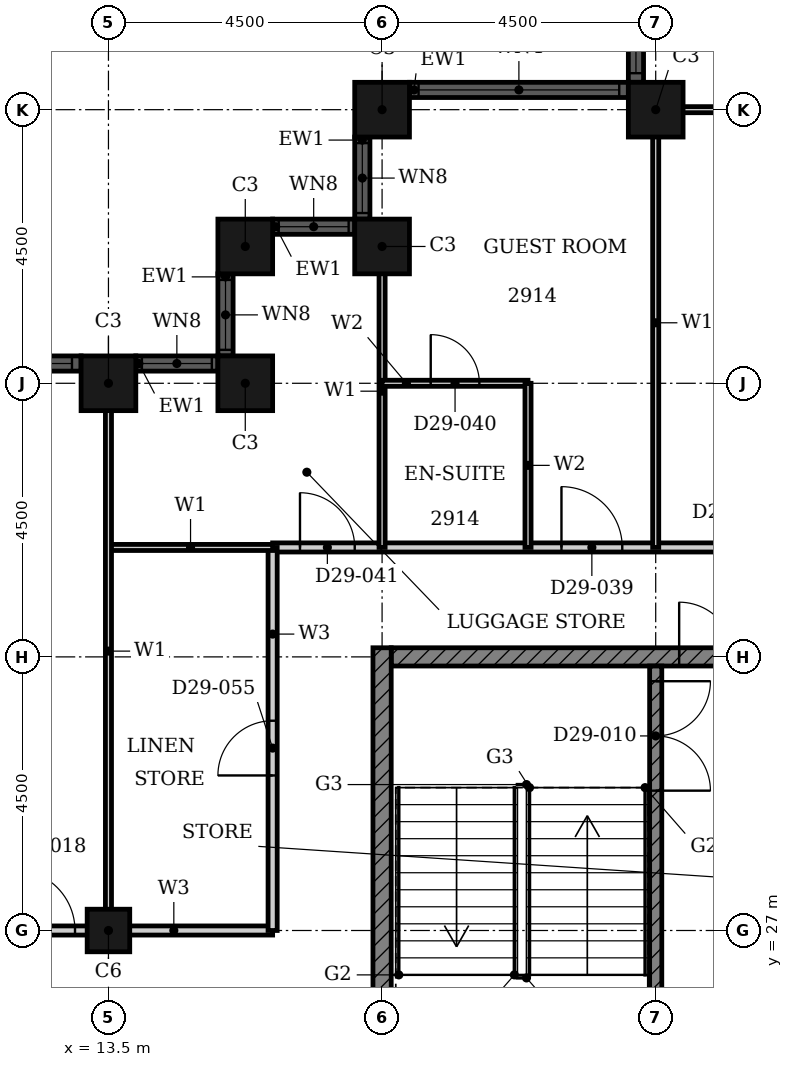
"""IFC4 building model, lengths in metres.
Left out: names, types, materials, properties, quantities, classifications, styles, units other than length and angle.
Written with IfcOpenShell. Run it as: python <this file> out.ifc"""

import sys

from ifc_helpers import new_model, si_unit, direction, frame, frame_2d, origin, origin_2d, place, context, subcontext, project, spatial, rectangle, hollow_rectangle, extrude, element, fill, save


model = new_model("IFC4")
c1 = context("Model", 3, precision=1e-05, world=origin(), true_north=direction((0.0, 1.0)))
c2 = subcontext(c1, "Body", "Model", "MODEL_VIEW")
j1 = project(units=[si_unit("LENGTHUNIT", "METRE"), si_unit("PLANEANGLEUNIT", "RADIAN")], contexts=[c1])
p1 = place(None, origin())
s1 = spatial("IfcSite", under=j1, at=p1, CompositionType="ELEMENT")
p2 = place(p1, origin())
s2 = spatial("IfcBuilding", under=s1, at=p2, CompositionType="ELEMENT")
p3 = place(p2, frame((0.0, 0.0, 118.8)))
s3 = spatial("IfcBuildingStorey", under=s2, at=p3, CompositionType="ELEMENT", Elevation=118.8)
for number, where, z_axis, x_axis in (
    (1, (22.5, 40.5, 0.0), (0.0, 0.0, 1.0), (1.0, 0.0, 0.0)),
    (2, (18.0, 40.5, 0.0), (0.0, 0.0, 1.0), (1.0, 0.0, 0.0)),
    (3, (18.0, 38.25, 0.0), (0.0, 0.0, 1.0), (1.0, 0.0, 0.0)),
    (4, (15.75, 38.25, 0.0), (0.0, 0.0, 1.0), (1.0, 0.0, 0.0)),
    (5, (15.75, 36.0, 0.0), (0.0, 0.0, 1.0), (1.0, 0.0, 0.0)),
    (6, (13.5, 36.0, 0.0), (0.0, 0.0, 1.0), (1.0, 0.0, 0.0)),
):
    element("IfcColumn", number, at=place(p3, frame(where, z_axis=z_axis, x_axis=x_axis)), inside=s3, PredefinedType="COLUMN", context=c2, shape_type="SweptSolid", body=[
        extrude(hollow_rectangle(XDim=0.9, YDim=0.9, WallThickness=0.028, at=origin_2d()), origin(), (0.0, 0.0, 1.0), 3.6),
    ])
p4 = place(p3, frame((13.5, 27.0, 0.0), z_axis=(0.0, 0.0, 1.0), x_axis=(1.0, 0.0, 0.0)))
e7 = element("IfcColumn", 7, at=p4, inside=s3, PredefinedType="COLUMN", context=c2, shape_type="SweptSolid", body=[
    extrude(hollow_rectangle(XDim=0.7, YDim=0.7, WallThickness=0.022, at=origin_2d()), origin(), (0.0, 0.0, 1.0), 3.6),
])
p5 = place(p3, frame((22.175, 49.05, 0.0), z_axis=(0.0, 0.0, 1.0), x_axis=(0.0, -1.0, 0.0)))
e8 = element("IfcWall", 8, at=p5, inside=s3, PredefinedType="SOLIDWALL", context=c2, shape_type="SweptSolid", body=[
    extrude(rectangle(XDim=8.1, YDim=0.25, at=frame_2d((4.05, 0.0))), origin(), (0.0, 0.0, 1.0), 3.6),
])
p6 = place(p5, frame((0.15, 0.0, 0.9)))
e9 = element("IfcOpeningElement", 9, at=p6, cuts=e8, PredefinedType="OPENING", context=c2, shape_type="SweptSolid", body=[
    extrude(rectangle(XDim=3.3, YDim=2.08, at=frame_2d((1.65, 1.04))), frame((0.0, 0.135, 0.0), z_axis=(0.0, -1.0, 0.0), x_axis=(1.0, 0.0, 0.0)), (0.0, 0.0, 1.0), 0.27),
])
p7 = place(p5, frame((4.65, 0.0, 0.9)))
e10 = element("IfcOpeningElement", 10, at=p7, cuts=e8, PredefinedType="OPENING", context=c2, shape_type="SweptSolid", body=[
    extrude(rectangle(XDim=3.3, YDim=2.08, at=frame_2d((1.65, 1.04))), frame((0.0, 0.135, 0.0), z_axis=(0.0, -1.0, 0.0), x_axis=(1.0, 0.0, 0.0)), (0.0, 0.0, 1.0), 0.27),
])
p8 = place(p3, frame((22.05, 40.825, 0.0), z_axis=(0.0, 0.0, 1.0), x_axis=(-1.0, 0.0, 0.0)))
e11 = element("IfcWall", 11, at=p8, inside=s3, PredefinedType="SOLIDWALL", context=c2, shape_type="SweptSolid", body=[
    extrude(rectangle(XDim=3.6, YDim=0.25, at=frame_2d((1.8, 0.0))), origin(), (0.0, 0.0, 1.0), 3.6),
])
p9 = place(p8, frame((0.15, 0.0, 0.9)))
e12 = element("IfcOpeningElement", 12, at=p9, cuts=e11, PredefinedType="OPENING", context=c2, shape_type="SweptSolid", body=[
    extrude(rectangle(XDim=3.3, YDim=2.08, at=frame_2d((1.65, 1.04))), frame((0.0, 0.135, 0.0), z_axis=(0.0, -1.0, 0.0), x_axis=(1.0, 0.0, 0.0)), (0.0, 0.0, 1.0), 0.27),
])
p10 = place(p3, frame((17.675, 40.05, 0.0), z_axis=(0.0, 0.0, 1.0), x_axis=(0.0, -1.0, 0.0)))
e13 = element("IfcWall", 13, at=p10, inside=s3, PredefinedType="SOLIDWALL", context=c2, shape_type="SweptSolid", body=[
    extrude(rectangle(XDim=1.35, YDim=0.25, at=frame_2d((0.675, 0.0))), origin(), (0.0, 0.0, 1.0), 3.6),
])
p11 = place(p10, frame((0.1, 0.0, 0.9)))
e14 = element("IfcOpeningElement", 14, at=p11, cuts=e13, PredefinedType="OPENING", context=c2, shape_type="SweptSolid", body=[
    extrude(rectangle(XDim=1.15, YDim=2.08, at=frame_2d((0.575, 1.04))), frame((0.0, 0.135, 0.0), z_axis=(0.0, -1.0, 0.0), x_axis=(1.0, 0.0, 0.0)), (0.0, 0.0, 1.0), 0.27),
])
p12 = place(p3, frame((17.55, 38.575, 0.0), z_axis=(0.0, 0.0, 1.0), x_axis=(-1.0, 0.0, 0.0)))
e15 = element("IfcWall", 15, at=p12, inside=s3, PredefinedType="SOLIDWALL", context=c2, shape_type="SweptSolid", body=[
    extrude(rectangle(XDim=1.35, YDim=0.25, at=frame_2d((0.675, 0.0))), origin(), (0.0, 0.0, 1.0), 3.6),
])
p13 = place(p12, frame((0.1, 0.0, 0.9)))
e16 = element("IfcOpeningElement", 16, at=p13, cuts=e15, PredefinedType="OPENING", context=c2, shape_type="SweptSolid", body=[
    extrude(rectangle(XDim=1.15, YDim=2.08, at=frame_2d((0.575, 1.04))), frame((0.0, 0.135, 0.0), z_axis=(0.0, -1.0, 0.0), x_axis=(1.0, 0.0, 0.0)), (0.0, 0.0, 1.0), 0.27),
])
p14 = place(p3, frame((15.425, 37.8, 0.0), z_axis=(0.0, 0.0, 1.0), x_axis=(0.0, -1.0, 0.0)))
e17 = element("IfcWall", 17, at=p14, inside=s3, PredefinedType="SOLIDWALL", context=c2, shape_type="SweptSolid", body=[
    extrude(rectangle(XDim=1.35, YDim=0.25, at=frame_2d((0.675, 0.0))), origin(), (0.0, 0.0, 1.0), 3.6),
])
p15 = place(p14, frame((0.1, 0.0, 0.9)))
e18 = element("IfcOpeningElement", 18, at=p15, cuts=e17, PredefinedType="OPENING", context=c2, shape_type="SweptSolid", body=[
    extrude(rectangle(XDim=1.15, YDim=2.08, at=frame_2d((0.575, 1.04))), frame((0.0, 0.135, 0.0), z_axis=(0.0, -1.0, 0.0), x_axis=(1.0, 0.0, 0.0)), (0.0, 0.0, 1.0), 0.27),
])
p16 = place(p3, frame((15.3, 36.325, 0.0), z_axis=(0.0, 0.0, 1.0), x_axis=(-1.0, 0.0, 0.0)))
e19 = element("IfcWall", 19, at=p16, inside=s3, PredefinedType="SOLIDWALL", context=c2, shape_type="SweptSolid", body=[
    extrude(rectangle(XDim=1.35, YDim=0.25, at=frame_2d((0.675, 0.0))), origin(), (0.0, 0.0, 1.0), 3.6),
])
p17 = place(p16, frame((0.1, 0.0, 0.9)))
e20 = element("IfcOpeningElement", 20, at=p17, cuts=e19, PredefinedType="OPENING", context=c2, shape_type="SweptSolid", body=[
    extrude(rectangle(XDim=1.15, YDim=2.08, at=frame_2d((0.575, 1.04))), frame((0.0, 0.135, 0.0), z_axis=(0.0, -1.0, 0.0), x_axis=(1.0, 0.0, 0.0)), (0.0, 0.0, 1.0), 0.27),
])
p18 = place(p3, frame((13.05, 36.325, 0.0), z_axis=(0.0, 0.0, 1.0), x_axis=(-1.0, 0.0, 0.0)))
e21 = element("IfcWall", 21, at=p18, inside=s3, PredefinedType="SOLIDWALL", context=c2, shape_type="SweptSolid", body=[
    extrude(rectangle(XDim=8.1, YDim=0.25, at=frame_2d((4.05, 0.0))), origin(), (0.0, 0.0, 1.0), 3.6),
])
p19 = place(p18, frame((0.15, 0.0, 0.9)))
e22 = element("IfcOpeningElement", 22, at=p19, cuts=e21, PredefinedType="OPENING", context=c2, shape_type="SweptSolid", body=[
    extrude(rectangle(XDim=3.3, YDim=2.08, at=frame_2d((1.65, 1.04))), frame((0.0, 0.135, 0.0), z_axis=(0.0, -1.0, 0.0), x_axis=(1.0, 0.0, 0.0)), (0.0, 0.0, 1.0), 0.27),
])
p20 = place(p18, frame((4.65, 0.0, 0.9)))
e23 = element("IfcOpeningElement", 23, at=p20, cuts=e21, PredefinedType="OPENING", context=c2, shape_type="SweptSolid", body=[
    extrude(rectangle(XDim=3.3, YDim=2.08, at=frame_2d((1.65, 1.04))), frame((0.0, 0.135, 0.0), z_axis=(0.0, -1.0, 0.0), x_axis=(1.0, 0.0, 0.0)), (0.0, 0.0, 1.0), 0.27),
])
p21 = place(p3, frame((18.15, 31.5, 0.0), z_axis=(0.0, 0.0, 1.0), x_axis=(1.0, 0.0, 0.0)))
e24 = element("IfcWall", 24, at=p21, inside=s3, PredefinedType="SHEAR", context=c2, shape_type="SweptSolid", body=[
    extrude(rectangle(XDim=6.797, YDim=0.3, at=frame_2d((3.398, 0.0))), origin(), (0.0, 0.0, 1.0), 3.3),
])
p22 = place(p21, frame((4.736, 0.0, 0.0)))
e25 = element("IfcOpeningElement", 25, at=p22, cuts=e24, PredefinedType="OPENING", context=c2, shape_type="SweptSolid", body=[
    extrude(rectangle(XDim=1.8, YDim=2.1, at=frame_2d((0.9, 1.05))), frame((0.0, 0.16, 0.0), z_axis=(0.0, -1.0, 0.0), x_axis=(1.0, 0.0, 0.0)), (0.0, 0.0, 1.0), 0.32),
])
p23 = place(p3, frame((18.0, 22.35, 0.0), z_axis=(0.0, 0.0, 1.0), x_axis=(0.0, 1.0, 0.0)))
e26 = element("IfcWall", 26, at=p23, inside=s3, PredefinedType="SHEAR", context=c2, shape_type="SweptSolid", body=[
    extrude(rectangle(XDim=9.3, YDim=0.3, at=frame_2d((4.65, 0.0))), origin(), (0.0, 0.0, 1.0), 3.3),
])
p24 = place(p3, frame((22.5, 31.35, 0.0), z_axis=(0.0, 0.0, 1.0), x_axis=(0.0, -1.0, 0.0)))
e27 = element("IfcWall", 27, at=p24, inside=s3, PredefinedType="SHEAR", context=c2, shape_type="SweptSolid", body=[
    extrude(rectangle(XDim=5.825, YDim=0.2, at=frame_2d((2.913, 0.0))), origin(), (0.0, 0.0, 1.0), 3.3),
])
p25 = place(p24, frame((0.25, 0.0, 0.0)))
e28 = element("IfcOpeningElement", 28, at=p25, cuts=e27, PredefinedType="OPENING", context=c2, shape_type="SweptSolid", body=[
    extrude(rectangle(XDim=1.8, YDim=2.1, at=frame_2d((0.9, 1.05))), frame((0.0, 0.11, 0.0), z_axis=(0.0, -1.0, 0.0), x_axis=(1.0, 0.0, 0.0)), (0.0, 0.0, 1.0), 0.22),
])
p26 = place(p3, frame((9.0, 27.0, 0.0), z_axis=(0.0, 0.0, 1.0), x_axis=(1.0, 0.0, 0.0)))
e29 = element("IfcWall", 29, at=p26, inside=s3, PredefinedType="PARTITIONING", context=c2, shape_type="SweptSolid", body=[
    extrude(rectangle(XDim=7.2, YDim=0.15, at=frame_2d((3.6, 0.0))), origin(), (0.0, 0.0, 1.0), 2.58),
])
p27 = place(p26, frame((2.95, 0.0, 0.0)))
e30 = element("IfcOpeningElement", 30, at=p27, cuts=e29, PredefinedType="OPENING", context=c2, shape_type="SweptSolid", body=[
    extrude(rectangle(XDim=1.0, YDim=2.1, at=frame_2d((0.5, 1.05))), frame((0.0, 0.085, 0.0), z_axis=(0.0, -1.0, 0.0), x_axis=(1.0, 0.0, 0.0)), (0.0, 0.0, 1.0), 0.17),
])
p28 = place(p3, frame((16.2, 33.3, 0.0), z_axis=(0.0, 0.0, 1.0), x_axis=(1.0, 0.0, 0.0)))
e31 = element("IfcWall", 31, at=p28, inside=s3, PredefinedType="PARTITIONING", context=c2, shape_type="SweptSolid", body=[
    extrude(rectangle(XDim=15.3, YDim=0.15, at=frame_2d((7.65, 0.0))), origin(), (0.0, 0.0, 1.0), 3.3),
])
p29 = place(p28, frame((4.75, 0.0, 0.0)))
e32 = element("IfcOpeningElement", 32, at=p29, cuts=e31, PredefinedType="OPENING", context=c2, shape_type="SweptSolid", body=[
    extrude(rectangle(XDim=1.0, YDim=2.1, at=frame_2d((0.5, 1.05))), frame((0.0, 0.085, 0.0), z_axis=(0.0, -1.0, 0.0), x_axis=(1.0, 0.0, 0.0)), (0.0, 0.0, 1.0), 0.17),
])
p30 = place(p28, frame((0.45, 0.0, 0.0)))
e33 = element("IfcOpeningElement", 33, at=p30, cuts=e31, PredefinedType="OPENING", context=c2, shape_type="SweptSolid", body=[
    extrude(rectangle(XDim=0.9, YDim=2.1, at=frame_2d((0.45, 1.05))), frame((0.0, 0.085, 0.0), z_axis=(0.0, -1.0, 0.0), x_axis=(1.0, 0.0, 0.0)), (0.0, 0.0, 1.0), 0.17),
])
p31 = place(p28, frame((10.35, 0.0, 0.0)))
e34 = element("IfcOpeningElement", 34, at=p31, cuts=e31, PredefinedType="OPENING", context=c2, shape_type="SweptSolid", body=[
    extrude(rectangle(XDim=0.9, YDim=2.1, at=frame_2d((0.45, 1.05))), frame((0.0, 0.085, 0.0), z_axis=(0.0, -1.0, 0.0), x_axis=(1.0, 0.0, 0.0)), (0.0, 0.0, 1.0), 0.17),
])
p32 = place(p3, frame((16.2, 27.0, 0.0), z_axis=(0.0, 0.0, 1.0), x_axis=(0.0, 1.0, 0.0)))
e35 = element("IfcWall", 35, at=p32, inside=s3, PredefinedType="PARTITIONING", context=c2, shape_type="SweptSolid", body=[
    extrude(rectangle(XDim=6.3, YDim=0.15, at=frame_2d((3.15, 0.0))), origin(), (0.0, 0.0, 1.0), 3.3),
])
p33 = place(p32, frame((2.55, 0.0, 0.0)))
e36 = element("IfcOpeningElement", 36, at=p33, cuts=e35, PredefinedType="OPENING", context=c2, shape_type="SweptSolid", body=[
    extrude(rectangle(XDim=0.9, YDim=2.1, at=frame_2d((0.45, 1.05))), frame((0.0, 0.085, 0.0), z_axis=(0.0, -1.0, 0.0), x_axis=(1.0, 0.0, 0.0)), (0.0, 0.0, 1.0), 0.17),
])
p34 = place(p3, frame((13.5, 33.3, 0.0), z_axis=(0.0, 0.0, 1.0), x_axis=(1.0, 0.0, 0.0)))
e37 = element("IfcWall", 37, at=p34, inside=s3, PredefinedType="PARTITIONING", context=c2, shape_type="SweptSolid", body=[
    extrude(rectangle(XDim=2.7, YDim=0.1, at=frame_2d((1.35, 0.0))), origin(), (0.0, 0.0, 1.0), 3.3),
])
for number, where, z_axis, x_axis in (
    (38, (22.31, 40.5, 0.0), (0.0, 0.0, 1.0), (1.0, 0.0, 0.0)),
    (39, (13.5, 27.0, 0.0), (0.0, 0.0, 1.0), (0.0, 1.0, 0.0)),
):
    element("IfcWall", number, at=place(p3, frame(where, z_axis=z_axis, x_axis=x_axis)), inside=s3, PredefinedType="PARTITIONING", context=c2, shape_type="SweptSolid", body=[
        extrude(rectangle(XDim=9.19, YDim=0.1, at=frame_2d((4.595, 0.0))), origin(), (0.0, 0.0, 1.0), 2.38),
    ])
p35 = place(p3, frame((18.0, 33.3, 0.0), z_axis=(0.0, 0.0, 1.0), x_axis=(0.0, 1.0, 0.0)))
e40 = element("IfcWall", 40, at=p35, inside=s3, PredefinedType="PARTITIONING", context=c2, shape_type="SweptSolid", body=[
    extrude(rectangle(XDim=5.14, YDim=0.1, at=frame_2d((2.57, 0.0))), origin(), (0.0, 0.0, 1.0), 3.3),
])
p36 = place(p3, frame((22.5, 33.3, 0.0), z_axis=(0.0, 0.0, 1.0), x_axis=(0.0, 1.0, 0.0)))
e41 = element("IfcWall", 41, at=p36, inside=s3, PredefinedType="PARTITIONING", context=c2, shape_type="SweptSolid", body=[
    extrude(rectangle(XDim=7.39, YDim=0.1, at=frame_2d((3.695, 0.0))), origin(), (0.0, 0.0, 1.0), 3.3),
])
p37 = place(p3, frame((18.0, 36.0, 0.0), z_axis=(0.0, 0.0, 1.0), x_axis=(1.0, 0.0, 0.0)))
e42 = element("IfcWall", 42, at=p37, inside=s3, PredefinedType="PARTITIONING", context=c2, shape_type="SweptSolid", body=[
    extrude(rectangle(XDim=2.4, YDim=0.1, at=frame_2d((1.2, 0.0))), origin(), (0.0, 0.0, 1.0), 3.3),
])
p38 = place(p37, frame((0.8, 0.0, 0.0)))
e43 = element("IfcOpeningElement", 43, at=p38, cuts=e42, PredefinedType="OPENING", context=c2, shape_type="SweptSolid", body=[
    extrude(rectangle(XDim=0.8, YDim=2.1, at=frame_2d((0.4, 1.05))), frame((0.0, 0.06, 0.0), z_axis=(0.0, -1.0, 0.0), x_axis=(1.0, 0.0, 0.0)), (0.0, 0.0, 1.0), 0.12),
])
p39 = place(p3, frame((20.4, 33.3, 0.0), z_axis=(0.0, 0.0, 1.0), x_axis=(0.0, 1.0, 0.0)))
e44 = element("IfcWall", 44, at=p39, inside=s3, PredefinedType="PARTITIONING", context=c2, shape_type="SweptSolid", body=[
    extrude(rectangle(XDim=2.7, YDim=0.1, at=frame_2d((1.35, 0.0))), origin(), (0.0, 0.0, 1.0), 3.3),
])
p40 = place(p7, origin())
e45 = element("IfcWindow", 45, at=p40, inside=s3, PartitioningType="SINGLE_PANEL", PredefinedType="WINDOW", context=c2, shape_type="SweptSolid", body=[
    extrude(rectangle(XDim=3.3, YDim=2.08, at=frame_2d((1.65, 1.04))), frame((0.0, 0.03, 0.0), z_axis=(0.0, -1.0, 0.0), x_axis=(1.0, 0.0, 0.0)), (0.0, 0.0, 1.0), 0.06),
])
fill(e10, e45)
p41 = place(p9, origin())
e46 = element("IfcWindow", 46, at=p41, inside=s3, PartitioningType="SINGLE_PANEL", PredefinedType="WINDOW", context=c2, shape_type="SweptSolid", body=[
    extrude(rectangle(XDim=3.3, YDim=2.08, at=frame_2d((1.65, 1.04))), frame((0.0, 0.03, 0.0), z_axis=(0.0, -1.0, 0.0), x_axis=(1.0, 0.0, 0.0)), (0.0, 0.0, 1.0), 0.06),
])
fill(e12, e46)
p42 = place(p11, origin())
e47 = element("IfcWindow", 47, at=p42, inside=s3, PartitioningType="SINGLE_PANEL", PredefinedType="WINDOW", context=c2, shape_type="SweptSolid", body=[
    extrude(rectangle(XDim=1.15, YDim=2.08, at=frame_2d((0.575, 1.04))), frame((0.0, 0.03, 0.0), z_axis=(0.0, -1.0, 0.0), x_axis=(1.0, 0.0, 0.0)), (0.0, 0.0, 1.0), 0.06),
])
fill(e14, e47)
p43 = place(p13, origin())
e48 = element("IfcWindow", 48, at=p43, inside=s3, PartitioningType="SINGLE_PANEL", PredefinedType="WINDOW", context=c2, shape_type="SweptSolid", body=[
    extrude(rectangle(XDim=1.15, YDim=2.08, at=frame_2d((0.575, 1.04))), frame((0.0, 0.03, 0.0), z_axis=(0.0, -1.0, 0.0), x_axis=(1.0, 0.0, 0.0)), (0.0, 0.0, 1.0), 0.06),
])
fill(e16, e48)
p44 = place(p15, origin())
e49 = element("IfcWindow", 49, at=p44, inside=s3, PartitioningType="SINGLE_PANEL", PredefinedType="WINDOW", context=c2, shape_type="SweptSolid", body=[
    extrude(rectangle(XDim=1.15, YDim=2.08, at=frame_2d((0.575, 1.04))), frame((0.0, 0.03, 0.0), z_axis=(0.0, -1.0, 0.0), x_axis=(1.0, 0.0, 0.0)), (0.0, 0.0, 1.0), 0.06),
])
fill(e18, e49)
p45 = place(p17, origin())
e50 = element("IfcWindow", 50, at=p45, inside=s3, PartitioningType="SINGLE_PANEL", PredefinedType="WINDOW", context=c2, shape_type="SweptSolid", body=[
    extrude(rectangle(XDim=1.15, YDim=2.08, at=frame_2d((0.575, 1.04))), frame((0.0, 0.03, 0.0), z_axis=(0.0, -1.0, 0.0), x_axis=(1.0, 0.0, 0.0)), (0.0, 0.0, 1.0), 0.06),
])
fill(e20, e50)
p46 = place(p19, origin())
e51 = element("IfcWindow", 51, at=p46, inside=s3, PartitioningType="SINGLE_PANEL", PredefinedType="WINDOW", context=c2, shape_type="SweptSolid", body=[
    extrude(rectangle(XDim=3.3, YDim=2.08, at=frame_2d((1.65, 1.04))), frame((0.0, 0.03, 0.0), z_axis=(0.0, -1.0, 0.0), x_axis=(1.0, 0.0, 0.0)), (0.0, 0.0, 1.0), 0.06),
])
fill(e22, e51)
p47 = place(p25, origin())
e52 = element("IfcDoor", 52, at=p47, inside=s3, OperationType="DOUBLE_DOOR_SINGLE_SWING", PredefinedType="DOOR", context=c2, shape_type="SweptSolid", body=[
    extrude(rectangle(XDim=1.8, YDim=2.1, at=frame_2d((0.9, 1.05))), frame((0.0, 0.025, 0.0), z_axis=(0.0, -1.0, 0.0), x_axis=(1.0, 0.0, 0.0)), (0.0, 0.0, 1.0), 0.05),
])
fill(e28, e52)
p48 = place(p22, origin())
e53 = element("IfcDoor", 53, at=p48, inside=s3, OperationType="DOUBLE_DOOR_SINGLE_SWING", PredefinedType="DOOR", context=c2, shape_type="SweptSolid", body=[
    extrude(rectangle(XDim=1.8, YDim=2.1, at=frame_2d((0.9, 1.05))), frame((0.0, 0.025, 0.0), z_axis=(0.0, -1.0, 0.0), x_axis=(1.0, 0.0, 0.0)), (0.0, 0.0, 1.0), 0.05),
])
fill(e25, e53)
p49 = place(p27, origin())
e54 = element("IfcDoor", 54, at=p49, inside=s3, OperationType="SINGLE_SWING_RIGHT", PredefinedType="DOOR", context=c2, shape_type="SweptSolid", body=[
    extrude(rectangle(XDim=1.0, YDim=2.1, at=frame_2d((0.5, 1.05))), frame((0.0, 0.025, 0.0), z_axis=(0.0, -1.0, 0.0), x_axis=(1.0, 0.0, 0.0)), (0.0, 0.0, 1.0), 0.05),
])
fill(e30, e54)
p50 = place(p29, origin())
e55 = element("IfcDoor", 55, at=p50, inside=s3, OperationType="SINGLE_SWING_RIGHT", PredefinedType="DOOR", context=c2, shape_type="SweptSolid", body=[
    extrude(rectangle(XDim=1.0, YDim=2.1, at=frame_2d((0.5, 1.05))), frame((0.0, 0.025, 0.0), z_axis=(0.0, -1.0, 0.0), x_axis=(1.0, 0.0, 0.0)), (0.0, 0.0, 1.0), 0.05),
])
fill(e32, e55)
p51 = place(p38, origin())
e56 = element("IfcDoor", 56, at=p51, inside=s3, OperationType="SINGLE_SWING_LEFT", PredefinedType="DOOR", context=c2, shape_type="SweptSolid", body=[
    extrude(rectangle(XDim=0.8, YDim=2.1, at=frame_2d((0.4, 1.05))), frame((0.0, 0.025, 0.0), z_axis=(0.0, -1.0, 0.0), x_axis=(1.0, 0.0, 0.0)), (0.0, 0.0, 1.0), 0.05),
])
fill(e43, e56)
p52 = place(p30, origin())
e57 = element("IfcDoor", 57, at=p52, inside=s3, OperationType="SINGLE_SWING_LEFT", PredefinedType="DOOR", context=c2, shape_type="SweptSolid", body=[
    extrude(rectangle(XDim=0.9, YDim=2.1, at=frame_2d((0.45, 1.05))), frame((0.0, 0.025, 0.0), z_axis=(0.0, -1.0, 0.0), x_axis=(1.0, 0.0, 0.0)), (0.0, 0.0, 1.0), 0.05),
])
fill(e33, e57)
p53 = place(p33, origin())
e58 = element("IfcDoor", 58, at=p53, inside=s3, OperationType="SINGLE_SWING_LEFT", PredefinedType="DOOR", context=c2, shape_type="SweptSolid", body=[
    extrude(rectangle(XDim=0.9, YDim=2.1, at=frame_2d((0.45, 1.05))), frame((0.0, 0.025, 0.0), z_axis=(0.0, -1.0, 0.0), x_axis=(1.0, 0.0, 0.0)), (0.0, 0.0, 1.0), 0.05),
])
fill(e36, e58)
save(model, sys.argv[1])
